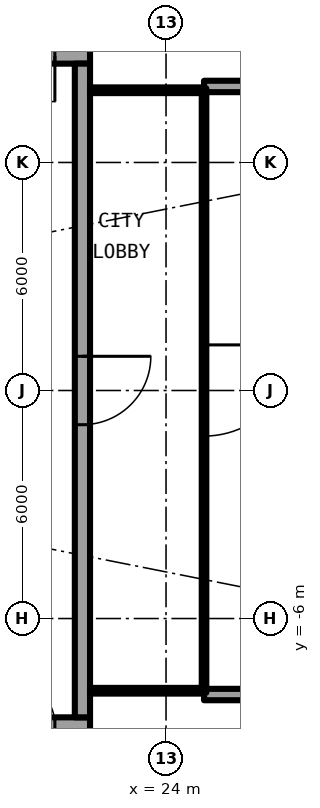
"""IFC4 building model, lengths in metres.
Left out: names, types, materials, properties, quantities, classifications, styles, units other than length and angle.
Written with IfcOpenShell. Run it as: python <this file> out.ifc"""

import sys

from ifc_helpers import new_model, si_unit, direction, frame, frame_2d, origin, place, context, subcontext, project, spatial, rectangle, extrude, element, fill, save


model = new_model("IFC4")
c1 = context("Model", 3, precision=1e-05, world=origin(), true_north=direction((0.0, 1.0)))
c2 = subcontext(c1, "Body", "Model", "MODEL_VIEW")
j1 = project(units=[si_unit("LENGTHUNIT", "METRE"), si_unit("PLANEANGLEUNIT", "RADIAN")], contexts=[c1])
p1 = place(None, origin())
s1 = spatial("IfcSite", under=j1, at=p1, CompositionType="ELEMENT")
p2 = place(p1, origin())
s2 = spatial("IfcBuilding", under=s1, at=p2, CompositionType="ELEMENT")
p3 = place(p2, frame((0.0, 0.0, 227.95)))
s3 = spatial("IfcBuildingStorey", under=s2, at=p3, CompositionType="ELEMENT", Elevation=227.95)
for number, where, z_axis, x_axis in (
    (1, (25.0, 8.0, 0.0), (0.0, 0.0, 1.0), (1.0, 0.0, 0.0)),
    (2, (25.0, -8.0, 0.0), (0.0, 0.0, 1.0), (1.0, 0.0, 0.0)),
):
    element("IfcWall", number, at=place(p3, frame(where, z_axis=z_axis, x_axis=x_axis)), inside=s3, PredefinedType="SOLIDWALL", context=c2, shape_type="SweptSolid", body=[
        extrude(rectangle(XDim=2.667, YDim=0.3, at=frame_2d((1.333, 0.0))), origin(), (0.0, 0.0, 1.0), 2.7),
    ])
p4 = place(p3, frame((22.0, 8.8, 0.0), z_axis=(0.0, 0.0, 1.0), x_axis=(-1.0, 0.0, 0.0)))
e3 = element("IfcWall", 3, at=p4, inside=s3, PredefinedType="SHEAR", context=c2, shape_type="SweptSolid", body=[
    extrude(rectangle(XDim=13.4, YDim=0.4, at=frame_2d((6.7, 0.0))), origin(), (0.0, 0.0, 1.0), 3.05),
])
p5 = place(p4, frame((0.925, 0.0, 0.0)))
e4 = element("IfcOpeningElement", 4, at=p5, cuts=e3, PredefinedType="OPENING", context=c2, shape_type="SweptSolid", body=[
    extrude(rectangle(XDim=1.2, YDim=2.3, at=frame_2d((0.6, 1.15))), frame((0.0, 0.21, 0.0), z_axis=(0.0, -1.0, 0.0), x_axis=(1.0, 0.0, 0.0)), (0.0, 0.0, 1.0), 0.42),
])
p6 = place(p3, frame((8.6, -8.8, 0.0), z_axis=(0.0, 0.0, 1.0), x_axis=(1.0, 0.0, 0.0)))
e5 = element("IfcWall", 5, at=p6, inside=s3, PredefinedType="SHEAR", context=c2, shape_type="SweptSolid", body=[
    extrude(rectangle(XDim=13.4, YDim=0.4, at=frame_2d((6.7, 0.0))), origin(), (0.0, 0.0, 1.0), 3.05),
])
p7 = place(p6, frame((11.275, 0.0, 0.0)))
e6 = element("IfcOpeningElement", 6, at=p7, cuts=e5, PredefinedType="OPENING", context=c2, shape_type="SweptSolid", body=[
    extrude(rectangle(XDim=1.2, YDim=2.3, at=frame_2d((0.6, 1.15))), frame((0.0, 0.21, 0.0), z_axis=(0.0, -1.0, 0.0), x_axis=(1.0, 0.0, 0.0)), (0.0, 0.0, 1.0), 0.42),
])
p8 = place(p3, frame((21.8, 8.6, 0.0), z_axis=(0.0, 0.0, 1.0), x_axis=(0.0, -1.0, 0.0)))
e7 = element("IfcWall", 7, at=p8, inside=s3, PredefinedType="SHEAR", context=c2, shape_type="SweptSolid", body=[
    extrude(rectangle(XDim=17.2, YDim=0.4, at=frame_2d((8.6, 0.0))), origin(), (0.0, 0.0, 1.0), 3.05),
])
p9 = place(p8, frame((7.7, 0.0, 0.0)))
e8 = element("IfcOpeningElement", 8, at=p9, cuts=e7, PredefinedType="OPENING", context=c2, shape_type="SweptSolid", body=[
    extrude(rectangle(XDim=1.8, YDim=2.3, at=frame_2d((0.9, 1.15))), frame((0.0, 0.21, 0.0), z_axis=(0.0, -1.0, 0.0), x_axis=(1.0, 0.0, 0.0)), (0.0, 0.0, 1.0), 0.42),
])
for number, where, z_axis, x_axis in (
    (9, (22.0, -7.9, 0.0), (0.0, 0.0, 1.0), (1.0, 0.0, 0.0)),
    (10, (22.0, 7.9, 0.0), (0.0, 0.0, 1.0), (1.0, 0.0, 0.0)),
):
    element("IfcWall", number, at=place(p3, frame(where, z_axis=z_axis, x_axis=x_axis)), inside=s3, PredefinedType="PARTITIONING", context=c2, shape_type="SweptSolid", body=[
        extrude(rectangle(XDim=2.94, YDim=0.15, at=frame_2d((1.47, 0.0))), origin(), (0.0, 0.0, 1.0), 2.7),
    ])
p10 = place(p3, frame((25.0, 7.95, 0.0), z_axis=(0.0, 0.0, 1.0), x_axis=(0.0, -1.0, 0.0)))
e11 = element("IfcWall", 11, at=p10, inside=s3, PredefinedType="PARTITIONING", context=c2, shape_type="SweptSolid", body=[
    extrude(rectangle(XDim=15.9, YDim=0.12, at=frame_2d((7.95, 0.0))), origin(), (0.0, 0.0, 1.0), 2.7),
])
p11 = place(p10, frame((6.75, 0.0, 0.0)))
e12 = element("IfcOpeningElement", 12, at=p11, cuts=e11, PredefinedType="OPENING", context=c2, shape_type="SweptSolid", body=[
    extrude(rectangle(XDim=2.4, YDim=2.3, at=frame_2d((1.2, 1.15))), frame((0.0, 0.07, 0.0), z_axis=(0.0, -1.0, 0.0), x_axis=(1.0, 0.0, 0.0)), (0.0, 0.0, 1.0), 0.14),
])
p12 = place(p10, frame((11.55, 0.0, 0.1)))
e13 = element("IfcOpeningElement", 13, at=p12, cuts=e11, PredefinedType="OPENING", context=c2, shape_type="SweptSolid", body=[
    extrude(rectangle(XDim=3.4, YDim=2.35, at=frame_2d((1.7, 1.175))), frame((0.0, 0.07, 0.0), z_axis=(0.0, -1.0, 0.0), x_axis=(1.0, 0.0, 0.0)), (0.0, 0.0, 1.0), 0.14),
])
p13 = place(p10, frame((0.95, 0.0, 0.1)))
e14 = element("IfcOpeningElement", 14, at=p13, cuts=e11, PredefinedType="OPENING", context=c2, shape_type="SweptSolid", body=[
    extrude(rectangle(XDim=3.4, YDim=2.35, at=frame_2d((1.7, 1.175))), frame((0.0, 0.07, 0.0), z_axis=(0.0, -1.0, 0.0), x_axis=(1.0, 0.0, 0.0)), (0.0, 0.0, 1.0), 0.14),
])
p14 = place(p5, origin())
e15 = element("IfcDoor", 15, at=p14, inside=s3, OperationType="SINGLE_SWING_RIGHT", PredefinedType="DOOR", context=c2, shape_type="SweptSolid", body=[
    extrude(rectangle(XDim=1.2, YDim=2.3, at=frame_2d((0.6, 1.15))), frame((0.0, 0.025, 0.0), z_axis=(0.0, -1.0, 0.0), x_axis=(1.0, 0.0, 0.0)), (0.0, 0.0, 1.0), 0.05),
])
fill(e4, e15)
p15 = place(p7, origin())
e16 = element("IfcDoor", 16, at=p15, inside=s3, OperationType="SINGLE_SWING_LEFT", PredefinedType="DOOR", context=c2, shape_type="SweptSolid", body=[
    extrude(rectangle(XDim=1.2, YDim=2.3, at=frame_2d((0.6, 1.15))), frame((0.0, 0.025, 0.0), z_axis=(0.0, -1.0, 0.0), x_axis=(1.0, 0.0, 0.0)), (0.0, 0.0, 1.0), 0.05),
])
fill(e6, e16)
p16 = place(p9, origin())
e17 = element("IfcDoor", 17, at=p16, inside=s3, OperationType="SINGLE_SWING_LEFT", PredefinedType="DOOR", context=c2, shape_type="SweptSolid", body=[
    extrude(rectangle(XDim=1.8, YDim=2.3, at=frame_2d((0.9, 1.15))), frame((0.0, 0.025, 0.0), z_axis=(0.0, -1.0, 0.0), x_axis=(1.0, 0.0, 0.0)), (0.0, 0.0, 1.0), 0.05),
])
fill(e8, e17)
p17 = place(p11, origin())
e18 = element("IfcDoor", 18, at=p17, inside=s3, OperationType="SINGLE_SWING_LEFT", PredefinedType="DOOR", context=c2, shape_type="SweptSolid", body=[
    extrude(rectangle(XDim=2.4, YDim=2.3, at=frame_2d((1.2, 1.15))), frame((0.0, 0.025, 0.0), z_axis=(0.0, -1.0, 0.0), x_axis=(1.0, 0.0, 0.0)), (0.0, 0.0, 1.0), 0.05),
])
fill(e12, e18)
p18 = place(p12, origin())
e19 = element("IfcWindow", 19, at=p18, inside=s3, PartitioningType="SINGLE_PANEL", PredefinedType="WINDOW", context=c2, shape_type="SweptSolid", body=[
    extrude(rectangle(XDim=3.4, YDim=2.35, at=frame_2d((1.7, 1.175))), frame((0.0, 0.03, 0.0), z_axis=(0.0, -1.0, 0.0), x_axis=(1.0, 0.0, 0.0)), (0.0, 0.0, 1.0), 0.06),
])
fill(e13, e19)
p19 = place(p13, origin())
e20 = element("IfcWindow", 20, at=p19, inside=s3, PartitioningType="SINGLE_PANEL", PredefinedType="WINDOW", context=c2, shape_type="SweptSolid", body=[
    extrude(rectangle(XDim=3.4, YDim=2.35, at=frame_2d((1.7, 1.175))), frame((0.0, 0.03, 0.0), z_axis=(0.0, -1.0, 0.0), x_axis=(1.0, 0.0, 0.0)), (0.0, 0.0, 1.0), 0.06),
])
fill(e14, e20)
save(model, sys.argv[1])
